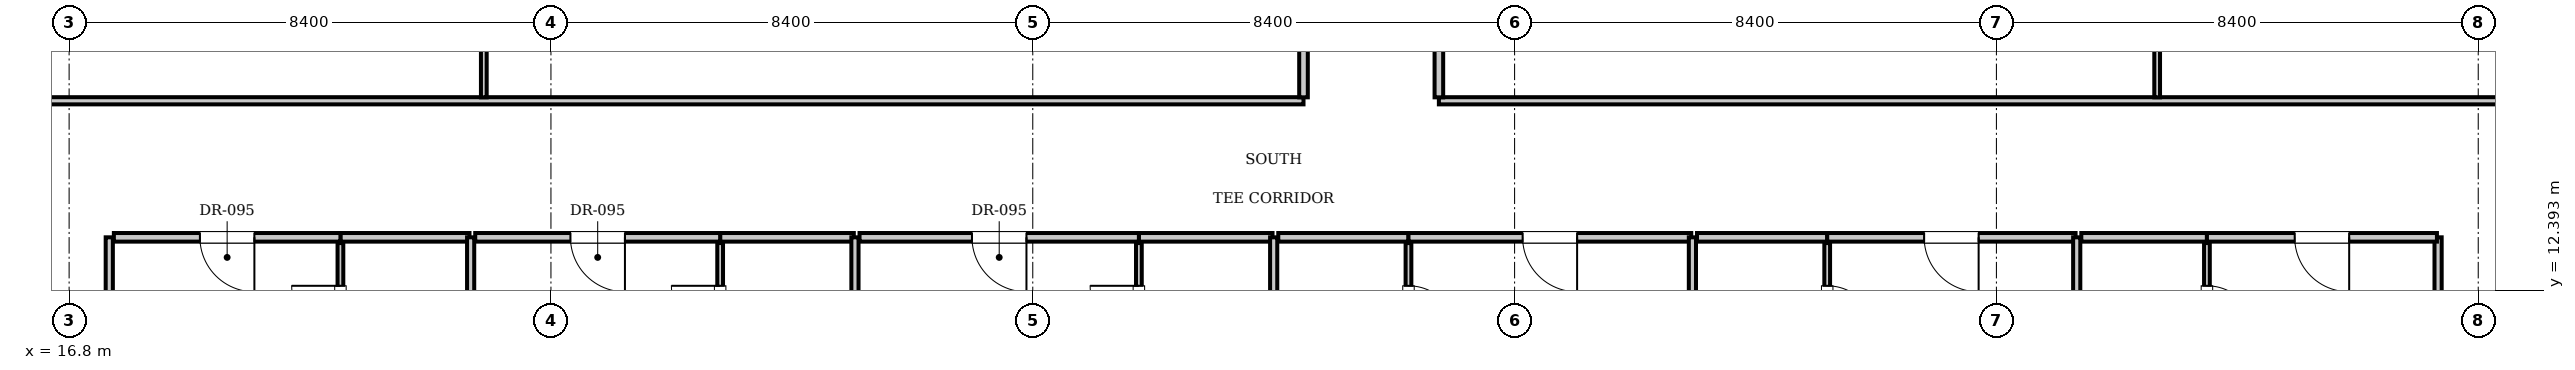
"""IFC4 building model, lengths in metres.
Left out: names, types, materials, properties, quantities, classifications, styles, units other than length and angle.
Written with IfcOpenShell. Run it as: python <this file> out.ifc"""

import sys

from ifc_helpers import new_model, si_unit, direction, frame, frame_2d, origin, place, context, subcontext, project, spatial, rectangle, extrude, element, fill, save


model = new_model("IFC4")
c1 = context("Model", 3, precision=1e-05, world=origin(), true_north=direction((0.0, 1.0)))
c2 = subcontext(c1, "Body", "Model", "MODEL_VIEW")
j1 = project(units=[si_unit("LENGTHUNIT", "METRE"), si_unit("PLANEANGLEUNIT", "RADIAN")], contexts=[c1])
p1 = place(None, origin())
s1 = spatial("IfcSite", under=j1, at=p1, CompositionType="ELEMENT")
p2 = place(p1, origin())
s2 = spatial("IfcBuilding", under=s1, at=p2, CompositionType="ELEMENT")
p3 = place(p2, frame((0.0, 0.0, 196.7)))
s3 = spatial("IfcBuildingStorey", under=s2, at=p3, CompositionType="ELEMENT", Elevation=196.7)
for number, where, z_axis, x_axis in (
    (1, (17.5, 9.0, 0.0), (0.0, 0.0, 1.0), (0.0, 1.0, 0.0)),
    (2, (58.1, 9.0, 0.0), (0.0, 0.0, 1.0), (0.0, 1.0, 0.0)),
):
    element("IfcWall", number, at=place(p3, frame(where, z_axis=z_axis, x_axis=x_axis)), inside=s3, PredefinedType="PARTITIONING", context=c2, shape_type="SweptSolid", body=[
        extrude(rectangle(XDim=4.32, YDim=0.125, at=frame_2d((2.16, 0.0))), origin(), (0.0, 0.0, 1.0), 3.61),
    ])
p4 = place(p3, frame((21.53, 13.32, 0.0), z_axis=(0.0, 0.0, 1.0), x_axis=(1.0, 0.0, 0.0)))
e3 = element("IfcWall", 3, at=p4, inside=s3, PredefinedType="PARTITIONING", context=c2, shape_type="SweptSolid", body=[
    extrude(rectangle(XDim=2.25, YDim=0.15, at=frame_2d((1.125, 0.0))), origin(), (0.0, 0.0, 1.0), 3.61),
])
p5 = place(p3, frame((21.53, 10.88, 0.0), z_axis=(0.0, 0.0, 1.0), x_axis=(0.0, 1.0, 0.0)))
e4 = element("IfcWall", 4, at=p5, inside=s3, PredefinedType="PARTITIONING", context=c2, shape_type="SweptSolid", body=[
    extrude(rectangle(XDim=2.34, YDim=0.1, at=frame_2d((1.17, 0.0))), origin(), (0.0, 0.0, 1.0), 3.61),
])
p6 = place(p5, frame((0.745, 0.0, 0.0)))
e5 = element("IfcOpeningElement", 5, at=p6, cuts=e4, PredefinedType="OPENING", context=c2, shape_type="SweptSolid", body=[
    extrude(rectangle(XDim=0.85, YDim=2.1, at=frame_2d((0.425, 1.05))), frame((0.0, 0.06, 0.0), z_axis=(0.0, -1.0, 0.0), x_axis=(1.0, 0.0, 0.0)), (0.0, 0.0, 1.0), 0.12),
])
p7 = place(p3, frame((17.58, 13.32, 0.0), z_axis=(0.0, 0.0, 1.0), x_axis=(1.0, 0.0, 0.0)))
e6 = element("IfcWall", 6, at=p7, inside=s3, PredefinedType="PARTITIONING", context=c2, shape_type="SweptSolid", body=[
    extrude(rectangle(XDim=3.95, YDim=0.15, at=frame_2d((1.975, 0.0))), origin(), (0.0, 0.0, 1.0), 3.61),
])
p8 = place(p7, frame((1.5, 0.0, 0.0)))
e7 = element("IfcOpeningElement", 7, at=p8, cuts=e6, PredefinedType="OPENING", context=c2, shape_type="SweptSolid", body=[
    extrude(rectangle(XDim=0.95, YDim=2.15, at=frame_2d((0.475, 1.075))), frame((0.0, 0.085, 0.0), z_axis=(0.0, -1.0, 0.0), x_axis=(1.0, 0.0, 0.0)), (0.0, 0.0, 1.0), 0.17),
])
p9 = place(p3, frame((23.8, 4.7, 0.0), z_axis=(0.0, 0.0, 1.0), x_axis=(0.0, 1.0, 0.0)))
e8 = element("IfcWall", 8, at=p9, inside=s3, PredefinedType="PARTITIONING", context=c2, shape_type="SweptSolid", body=[
    extrude(rectangle(XDim=8.62, YDim=0.125, at=frame_2d((4.31, 0.0))), origin(), (0.0, 0.0, 1.0), 3.61),
])
p10 = place(p3, frame((28.15, 13.32, 0.0), z_axis=(0.0, 0.0, 1.0), x_axis=(1.0, 0.0, 0.0)))
e9 = element("IfcWall", 9, at=p10, inside=s3, PredefinedType="PARTITIONING", context=c2, shape_type="SweptSolid", body=[
    extrude(rectangle(XDim=2.33, YDim=0.15, at=frame_2d((1.165, 0.0))), origin(), (0.0, 0.0, 1.0), 3.61),
])
p11 = place(p3, frame((28.15, 10.88, 0.0), z_axis=(0.0, 0.0, 1.0), x_axis=(0.0, 1.0, 0.0)))
e10 = element("IfcWall", 10, at=p11, inside=s3, PredefinedType="PARTITIONING", context=c2, shape_type="SweptSolid", body=[
    extrude(rectangle(XDim=2.34, YDim=0.1, at=frame_2d((1.17, 0.0))), origin(), (0.0, 0.0, 1.0), 3.61),
])
p12 = place(p11, frame((0.745, 0.0, 0.0)))
e11 = element("IfcOpeningElement", 11, at=p12, cuts=e10, PredefinedType="OPENING", context=c2, shape_type="SweptSolid", body=[
    extrude(rectangle(XDim=0.85, YDim=2.1, at=frame_2d((0.425, 1.05))), frame((0.0, 0.06, 0.0), z_axis=(0.0, -1.0, 0.0), x_axis=(1.0, 0.0, 0.0)), (0.0, 0.0, 1.0), 0.12),
])
p13 = place(p3, frame((23.88, 13.32, 0.0), z_axis=(0.0, 0.0, 1.0), x_axis=(1.0, 0.0, 0.0)))
e12 = element("IfcWall", 12, at=p13, inside=s3, PredefinedType="PARTITIONING", context=c2, shape_type="SweptSolid", body=[
    extrude(rectangle(XDim=4.27, YDim=0.15, at=frame_2d((2.135, 0.0))), origin(), (0.0, 0.0, 1.0), 3.61),
])
p14 = place(p13, frame((1.66, 0.0, 0.0)))
e13 = element("IfcOpeningElement", 13, at=p14, cuts=e12, PredefinedType="OPENING", context=c2, shape_type="SweptSolid", body=[
    extrude(rectangle(XDim=0.95, YDim=2.15, at=frame_2d((0.475, 1.075))), frame((0.0, 0.085, 0.0), z_axis=(0.0, -1.0, 0.0), x_axis=(1.0, 0.0, 0.0)), (0.0, 0.0, 1.0), 0.17),
])
p15 = place(p3, frame((30.5, 4.7, 0.0), z_axis=(0.0, 0.0, 1.0), x_axis=(0.0, 1.0, 0.0)))
e14 = element("IfcWall", 14, at=p15, inside=s3, PredefinedType="PARTITIONING", context=c2, shape_type="SweptSolid", body=[
    extrude(rectangle(XDim=8.62, YDim=0.125, at=frame_2d((4.31, 0.0))), origin(), (0.0, 0.0, 1.0), 3.61),
])
p16 = place(p3, frame((35.45, 13.32, 0.0), z_axis=(0.0, 0.0, 1.0), x_axis=(1.0, 0.0, 0.0)))
e15 = element("IfcWall", 15, at=p16, inside=s3, PredefinedType="PARTITIONING", context=c2, shape_type="SweptSolid", body=[
    extrude(rectangle(XDim=2.33, YDim=0.15, at=frame_2d((1.165, 0.0))), origin(), (0.0, 0.0, 1.0), 3.61),
])
p17 = place(p3, frame((35.45, 10.88, 0.0), z_axis=(0.0, 0.0, 1.0), x_axis=(0.0, 1.0, 0.0)))
e16 = element("IfcWall", 16, at=p17, inside=s3, PredefinedType="PARTITIONING", context=c2, shape_type="SweptSolid", body=[
    extrude(rectangle(XDim=2.34, YDim=0.1, at=frame_2d((1.17, 0.0))), origin(), (0.0, 0.0, 1.0), 3.61),
])
p18 = place(p17, frame((0.745, 0.0, 0.0)))
e17 = element("IfcOpeningElement", 17, at=p18, cuts=e16, PredefinedType="OPENING", context=c2, shape_type="SweptSolid", body=[
    extrude(rectangle(XDim=0.85, YDim=2.1, at=frame_2d((0.425, 1.05))), frame((0.0, 0.06, 0.0), z_axis=(0.0, -1.0, 0.0), x_axis=(1.0, 0.0, 0.0)), (0.0, 0.0, 1.0), 0.12),
])
p19 = place(p3, frame((30.58, 13.32, 0.0), z_axis=(0.0, 0.0, 1.0), x_axis=(1.0, 0.0, 0.0)))
e18 = element("IfcWall", 18, at=p19, inside=s3, PredefinedType="PARTITIONING", context=c2, shape_type="SweptSolid", body=[
    extrude(rectangle(XDim=4.87, YDim=0.15, at=frame_2d((2.435, 0.0))), origin(), (0.0, 0.0, 1.0), 3.61),
])
p20 = place(p19, frame((1.96, 0.0, 0.0)))
e19 = element("IfcOpeningElement", 19, at=p20, cuts=e18, PredefinedType="OPENING", context=c2, shape_type="SweptSolid", body=[
    extrude(rectangle(XDim=0.95, YDim=2.15, at=frame_2d((0.475, 1.075))), frame((0.0, 0.085, 0.0), z_axis=(0.0, -1.0, 0.0), x_axis=(1.0, 0.0, 0.0)), (0.0, 0.0, 1.0), 0.17),
])
p21 = place(p3, frame((37.8, 4.7, 0.0), z_axis=(0.0, 0.0, 1.0), x_axis=(0.0, 1.0, 0.0)))
e20 = element("IfcWall", 20, at=p21, inside=s3, PredefinedType="PARTITIONING", context=c2, shape_type="SweptSolid", body=[
    extrude(rectangle(XDim=8.62, YDim=0.125, at=frame_2d((4.31, 0.0))), origin(), (0.0, 0.0, 1.0), 3.344),
])
p22 = place(p3, frame((37.88, 13.32, 0.0), z_axis=(0.0, 0.0, 1.0), x_axis=(1.0, 0.0, 0.0)))
e21 = element("IfcWall", 21, at=p22, inside=s3, PredefinedType="PARTITIONING", context=c2, shape_type="SweptSolid", body=[
    extrude(rectangle(XDim=2.27, YDim=0.15, at=frame_2d((1.135, 0.0))), origin(), (0.0, 0.0, 1.0), 3.61),
])
p23 = place(p3, frame((40.15, 10.88, 0.0), z_axis=(0.0, 0.0, 1.0), x_axis=(0.0, 1.0, 0.0)))
e22 = element("IfcWall", 22, at=p23, inside=s3, PredefinedType="PARTITIONING", context=c2, shape_type="SweptSolid", body=[
    extrude(rectangle(XDim=2.34, YDim=0.1, at=frame_2d((1.17, 0.0))), origin(), (0.0, 0.0, 1.0), 3.61),
])
p24 = place(p23, frame((0.745, 0.0, 0.0)))
e23 = element("IfcOpeningElement", 23, at=p24, cuts=e22, PredefinedType="OPENING", context=c2, shape_type="SweptSolid", body=[
    extrude(rectangle(XDim=0.85, YDim=2.1, at=frame_2d((0.425, 1.05))), frame((0.0, 0.06, 0.0), z_axis=(0.0, -1.0, 0.0), x_axis=(1.0, 0.0, 0.0)), (0.0, 0.0, 1.0), 0.12),
])
p25 = place(p3, frame((40.15, 13.32, 0.0), z_axis=(0.0, 0.0, 1.0), x_axis=(1.0, 0.0, 0.0)))
e24 = element("IfcWall", 24, at=p25, inside=s3, PredefinedType="PARTITIONING", context=c2, shape_type="SweptSolid", body=[
    extrude(rectangle(XDim=4.93, YDim=0.15, at=frame_2d((2.465, 0.0))), origin(), (0.0, 0.0, 1.0), 3.61),
])
p26 = place(p25, frame((1.99, 0.0, 0.0)))
e25 = element("IfcOpeningElement", 25, at=p26, cuts=e24, PredefinedType="OPENING", context=c2, shape_type="SweptSolid", body=[
    extrude(rectangle(XDim=0.95, YDim=2.15, at=frame_2d((0.475, 1.075))), frame((0.0, 0.085, 0.0), z_axis=(0.0, -1.0, 0.0), x_axis=(1.0, 0.0, 0.0)), (0.0, 0.0, 1.0), 0.17),
])
p27 = place(p3, frame((45.1, 4.7, 0.0), z_axis=(0.0, 0.0, 1.0), x_axis=(0.0, 1.0, 0.0)))
e26 = element("IfcWall", 26, at=p27, inside=s3, PredefinedType="PARTITIONING", context=c2, shape_type="SweptSolid", body=[
    extrude(rectangle(XDim=8.62, YDim=0.125, at=frame_2d((4.31, 0.0))), origin(), (0.0, 0.0, 1.0), 3.61),
])
p28 = place(p3, frame((45.18, 13.32, 0.0), z_axis=(0.0, 0.0, 1.0), x_axis=(1.0, 0.0, 0.0)))
e27 = element("IfcWall", 27, at=p28, inside=s3, PredefinedType="PARTITIONING", context=c2, shape_type="SweptSolid", body=[
    extrude(rectangle(XDim=2.27, YDim=0.15, at=frame_2d((1.135, 0.0))), origin(), (0.0, 0.0, 1.0), 3.61),
])
p29 = place(p3, frame((47.45, 10.88, 0.0), z_axis=(0.0, 0.0, 1.0), x_axis=(0.0, 1.0, 0.0)))
e28 = element("IfcWall", 28, at=p29, inside=s3, PredefinedType="PARTITIONING", context=c2, shape_type="SweptSolid", body=[
    extrude(rectangle(XDim=2.34, YDim=0.1, at=frame_2d((1.17, 0.0))), origin(), (0.0, 0.0, 1.0), 3.61),
])
p30 = place(p29, frame((0.745, 0.0, 0.0)))
e29 = element("IfcOpeningElement", 29, at=p30, cuts=e28, PredefinedType="OPENING", context=c2, shape_type="SweptSolid", body=[
    extrude(rectangle(XDim=0.85, YDim=2.1, at=frame_2d((0.425, 1.05))), frame((0.0, 0.06, 0.0), z_axis=(0.0, -1.0, 0.0), x_axis=(1.0, 0.0, 0.0)), (0.0, 0.0, 1.0), 0.12),
])
p31 = place(p3, frame((47.45, 13.32, 0.0), z_axis=(0.0, 0.0, 1.0), x_axis=(1.0, 0.0, 0.0)))
e30 = element("IfcWall", 30, at=p31, inside=s3, PredefinedType="PARTITIONING", context=c2, shape_type="SweptSolid", body=[
    extrude(rectangle(XDim=4.33, YDim=0.15, at=frame_2d((2.165, 0.0))), origin(), (0.0, 0.0, 1.0), 3.61),
])
p32 = place(p31, frame((1.69, 0.0, 0.0)))
e31 = element("IfcOpeningElement", 31, at=p32, cuts=e30, PredefinedType="OPENING", context=c2, shape_type="SweptSolid", body=[
    extrude(rectangle(XDim=0.95, YDim=2.15, at=frame_2d((0.475, 1.075))), frame((0.0, 0.085, 0.0), z_axis=(0.0, -1.0, 0.0), x_axis=(1.0, 0.0, 0.0)), (0.0, 0.0, 1.0), 0.17),
])
p33 = place(p3, frame((51.8, 4.7, 0.0), z_axis=(0.0, 0.0, 1.0), x_axis=(0.0, 1.0, 0.0)))
e32 = element("IfcWall", 32, at=p33, inside=s3, PredefinedType="PARTITIONING", context=c2, shape_type="SweptSolid", body=[
    extrude(rectangle(XDim=8.62, YDim=0.125, at=frame_2d((4.31, 0.0))), origin(), (0.0, 0.0, 1.0), 3.61),
])
p34 = place(p3, frame((51.88, 13.32, 0.0), z_axis=(0.0, 0.0, 1.0), x_axis=(1.0, 0.0, 0.0)))
e33 = element("IfcWall", 33, at=p34, inside=s3, PredefinedType="PARTITIONING", context=c2, shape_type="SweptSolid", body=[
    extrude(rectangle(XDim=2.19, YDim=0.15, at=frame_2d((1.095, 0.0))), origin(), (0.0, 0.0, 1.0), 3.61),
])
p35 = place(p3, frame((54.07, 10.88, 0.0), z_axis=(0.0, 0.0, 1.0), x_axis=(0.0, 1.0, 0.0)))
e34 = element("IfcWall", 34, at=p35, inside=s3, PredefinedType="PARTITIONING", context=c2, shape_type="SweptSolid", body=[
    extrude(rectangle(XDim=2.34, YDim=0.1, at=frame_2d((1.17, 0.0))), origin(), (0.0, 0.0, 1.0), 3.61),
])
p36 = place(p35, frame((0.745, 0.0, 0.0)))
e35 = element("IfcOpeningElement", 35, at=p36, cuts=e34, PredefinedType="OPENING", context=c2, shape_type="SweptSolid", body=[
    extrude(rectangle(XDim=0.85, YDim=2.1, at=frame_2d((0.425, 1.05))), frame((0.0, 0.06, 0.0), z_axis=(0.0, -1.0, 0.0), x_axis=(1.0, 0.0, 0.0)), (0.0, 0.0, 1.0), 0.12),
])
p37 = place(p3, frame((54.07, 13.32, 0.0), z_axis=(0.0, 0.0, 1.0), x_axis=(1.0, 0.0, 0.0)))
e36 = element("IfcWall", 36, at=p37, inside=s3, PredefinedType="PARTITIONING", context=c2, shape_type="SweptSolid", body=[
    extrude(rectangle(XDim=4.01, YDim=0.15, at=frame_2d((2.005, 0.0))), origin(), (0.0, 0.0, 1.0), 3.61),
])
p38 = place(p37, frame((1.53, 0.0, 0.0)))
e37 = element("IfcOpeningElement", 37, at=p38, cuts=e36, PredefinedType="OPENING", context=c2, shape_type="SweptSolid", body=[
    extrude(rectangle(XDim=0.95, YDim=2.15, at=frame_2d((0.475, 1.075))), frame((0.0, 0.085, 0.0), z_axis=(0.0, -1.0, 0.0), x_axis=(1.0, 0.0, 0.0)), (0.0, 0.0, 1.0), 0.17),
])
p39 = place(p3, frame((13.2, 15.7, 0.0), z_axis=(0.0, 0.0, 1.0), x_axis=(1.0, 0.0, 0.0)))
e38 = element("IfcWall", 38, at=p39, inside=s3, PredefinedType="PARTITIONING", context=c2, shape_type="SweptSolid", body=[
    extrude(rectangle(XDim=25.12, YDim=0.125, at=frame_2d((12.56, 0.0))), origin(), (0.0, 0.0, 1.0), 3.61),
])
p40 = place(p3, frame((40.68, 15.7, 0.0), z_axis=(0.0, 0.0, 1.0), x_axis=(1.0, 0.0, 0.0)))
e39 = element("IfcWall", 39, at=p40, inside=s3, PredefinedType="PARTITIONING", context=c2, shape_type="SweptSolid", body=[
    extrude(rectangle(XDim=21.72, YDim=0.125, at=frame_2d((10.86, 0.0))), origin(), (0.0, 0.0, 1.0), 3.61),
])
p41 = place(p3, frame((38.32, 15.76, 0.0), z_axis=(0.0, 0.0, 1.0), x_axis=(0.0, 1.0, 0.0)))
e40 = element("IfcWall", 40, at=p41, inside=s3, PredefinedType="PARTITIONING", context=c2, shape_type="SweptSolid", body=[
    extrude(rectangle(XDim=5.14, YDim=0.15, at=frame_2d((2.57, 0.0))), origin(), (0.0, 0.0, 1.0), 3.61),
])
p42 = place(p41, frame((2.095, 0.0, 0.0)))
e41 = element("IfcOpeningElement", 41, at=p42, cuts=e40, PredefinedType="OPENING", context=c2, shape_type="SweptSolid", body=[
    extrude(rectangle(XDim=0.95, YDim=2.15, at=frame_2d((0.475, 1.075))), frame((0.0, 0.085, 0.0), z_axis=(0.0, -1.0, 0.0), x_axis=(1.0, 0.0, 0.0)), (0.0, 0.0, 1.0), 0.17),
])
p43 = place(p3, frame((24.03, 15.76, 0.0), z_axis=(0.0, 0.0, 1.0), x_axis=(0.0, 1.0, 0.0)))
e42 = element("IfcWall", 42, at=p43, inside=s3, PredefinedType="PARTITIONING", context=c2, shape_type="SweptSolid", body=[
    extrude(rectangle(XDim=7.43, YDim=0.1, at=frame_2d((3.715, 0.0))), origin(), (0.0, 0.0, 1.0), 3.61),
])
p44 = place(p43, frame((3.265, 0.0, 0.0)))
e43 = element("IfcOpeningElement", 43, at=p44, cuts=e42, PredefinedType="OPENING", context=c2, shape_type="SweptSolid", body=[
    extrude(rectangle(XDim=0.9, YDim=2.1, at=frame_2d((0.45, 1.05))), frame((0.0, 0.06, 0.0), z_axis=(0.0, -1.0, 0.0), x_axis=(1.0, 0.0, 0.0)), (0.0, 0.0, 1.0), 0.12),
])
p45 = place(p3, frame((40.68, 15.76, 0.0), z_axis=(0.0, 0.0, 1.0), x_axis=(0.0, 1.0, 0.0)))
e44 = element("IfcWall", 44, at=p45, inside=s3, PredefinedType="PARTITIONING", context=c2, shape_type="SweptSolid", body=[
    extrude(rectangle(XDim=5.14, YDim=0.15, at=frame_2d((2.57, 0.0))), origin(), (0.0, 0.0, 1.0), 3.61),
])
p46 = place(p45, frame((3.055, 0.0, 0.0)))
e45 = element("IfcOpeningElement", 45, at=p46, cuts=e44, PredefinedType="OPENING", context=c2, shape_type="SweptSolid", body=[
    extrude(rectangle(XDim=0.95, YDim=2.15, at=frame_2d((0.475, 1.075))), frame((0.0, 0.085, 0.0), z_axis=(0.0, -1.0, 0.0), x_axis=(1.0, 0.0, 0.0)), (0.0, 0.0, 1.0), 0.17),
])
p47 = place(p3, frame((53.202, 15.76, 0.0), z_axis=(0.0, 0.0, 1.0), x_axis=(0.0, 1.0, 0.0)))
e46 = element("IfcWall", 46, at=p47, inside=s3, PredefinedType="PARTITIONING", context=c2, shape_type="SweptSolid", body=[
    extrude(rectangle(XDim=7.43, YDim=0.1, at=frame_2d((3.715, 0.0))), origin(), (0.0, 0.0, 1.0), 3.61),
])
p48 = place(p47, frame((3.265, 0.0, 0.0)))
e47 = element("IfcOpeningElement", 47, at=p48, cuts=e46, PredefinedType="OPENING", context=c2, shape_type="SweptSolid", body=[
    extrude(rectangle(XDim=0.9, YDim=2.1, at=frame_2d((0.45, 1.05))), frame((0.0, 0.06, 0.0), z_axis=(0.0, -1.0, 0.0), x_axis=(1.0, 0.0, 0.0)), (0.0, 0.0, 1.0), 0.12),
])
p49 = place(p6, origin())
e48 = element("IfcDoor", 48, at=p49, inside=s3, OperationType="SINGLE_SWING_RIGHT", PredefinedType="DOOR", context=c2, shape_type="SweptSolid", body=[
    extrude(rectangle(XDim=0.85, YDim=2.1, at=frame_2d((0.425, 1.05))), frame((0.0, 0.025, 0.0), z_axis=(0.0, -1.0, 0.0), x_axis=(1.0, 0.0, 0.0)), (0.0, 0.0, 1.0), 0.05),
])
fill(e5, e48)
p50 = place(p8, frame((0.95, 0.0, 0.0), z_axis=(0.0, 0.0, 1.0), x_axis=(-1.0, 0.0, 0.0)))
e49 = element("IfcDoor", 49, at=p50, inside=s3, OperationType="SINGLE_SWING_LEFT", PredefinedType="DOOR", context=c2, shape_type="SweptSolid", body=[
    extrude(rectangle(XDim=0.95, YDim=2.15, at=frame_2d((0.475, 1.075))), frame((0.0, 0.025, 0.0), z_axis=(0.0, -1.0, 0.0), x_axis=(1.0, 0.0, 0.0)), (0.0, 0.0, 1.0), 0.05),
])
fill(e7, e49)
p51 = place(p12, origin())
e50 = element("IfcDoor", 50, at=p51, inside=s3, OperationType="SINGLE_SWING_RIGHT", PredefinedType="DOOR", context=c2, shape_type="SweptSolid", body=[
    extrude(rectangle(XDim=0.85, YDim=2.1, at=frame_2d((0.425, 1.05))), frame((0.0, 0.025, 0.0), z_axis=(0.0, -1.0, 0.0), x_axis=(1.0, 0.0, 0.0)), (0.0, 0.0, 1.0), 0.05),
])
fill(e11, e50)
p52 = place(p14, frame((0.95, 0.0, 0.0), z_axis=(0.0, 0.0, 1.0), x_axis=(-1.0, 0.0, 0.0)))
e51 = element("IfcDoor", 51, at=p52, inside=s3, OperationType="SINGLE_SWING_LEFT", PredefinedType="DOOR", context=c2, shape_type="SweptSolid", body=[
    extrude(rectangle(XDim=0.95, YDim=2.15, at=frame_2d((0.475, 1.075))), frame((0.0, 0.025, 0.0), z_axis=(0.0, -1.0, 0.0), x_axis=(1.0, 0.0, 0.0)), (0.0, 0.0, 1.0), 0.05),
])
fill(e13, e51)
p53 = place(p18, origin())
e52 = element("IfcDoor", 52, at=p53, inside=s3, OperationType="SINGLE_SWING_RIGHT", PredefinedType="DOOR", context=c2, shape_type="SweptSolid", body=[
    extrude(rectangle(XDim=0.85, YDim=2.1, at=frame_2d((0.425, 1.05))), frame((0.0, 0.025, 0.0), z_axis=(0.0, -1.0, 0.0), x_axis=(1.0, 0.0, 0.0)), (0.0, 0.0, 1.0), 0.05),
])
fill(e17, e52)
p54 = place(p20, frame((0.95, 0.0, 0.0), z_axis=(0.0, 0.0, 1.0), x_axis=(-1.0, 0.0, 0.0)))
e53 = element("IfcDoor", 53, at=p54, inside=s3, OperationType="SINGLE_SWING_LEFT", PredefinedType="DOOR", context=c2, shape_type="SweptSolid", body=[
    extrude(rectangle(XDim=0.95, YDim=2.15, at=frame_2d((0.475, 1.075))), frame((0.0, 0.025, 0.0), z_axis=(0.0, -1.0, 0.0), x_axis=(1.0, 0.0, 0.0)), (0.0, 0.0, 1.0), 0.05),
])
fill(e19, e53)
p55 = place(p24, frame((0.85, 0.0, 0.0), z_axis=(0.0, 0.0, 1.0), x_axis=(-1.0, 0.0, 0.0)))
e54 = element("IfcDoor", 54, at=p55, inside=s3, OperationType="SINGLE_SWING_RIGHT", PredefinedType="DOOR", context=c2, shape_type="SweptSolid", body=[
    extrude(rectangle(XDim=0.85, YDim=2.1, at=frame_2d((0.425, 1.05))), frame((0.0, 0.025, 0.0), z_axis=(0.0, -1.0, 0.0), x_axis=(1.0, 0.0, 0.0)), (0.0, 0.0, 1.0), 0.05),
])
fill(e23, e54)
p56 = place(p26, frame((0.95, 0.0, 0.0), z_axis=(0.0, 0.0, 1.0), x_axis=(-1.0, 0.0, 0.0)))
e55 = element("IfcDoor", 55, at=p56, inside=s3, OperationType="SINGLE_SWING_LEFT", PredefinedType="DOOR", context=c2, shape_type="SweptSolid", body=[
    extrude(rectangle(XDim=0.95, YDim=2.15, at=frame_2d((0.475, 1.075))), frame((0.0, 0.025, 0.0), z_axis=(0.0, -1.0, 0.0), x_axis=(1.0, 0.0, 0.0)), (0.0, 0.0, 1.0), 0.05),
])
fill(e25, e55)
p57 = place(p30, frame((0.85, 0.0, 0.0), z_axis=(0.0, 0.0, 1.0), x_axis=(-1.0, 0.0, 0.0)))
e56 = element("IfcDoor", 56, at=p57, inside=s3, OperationType="SINGLE_SWING_RIGHT", PredefinedType="DOOR", context=c2, shape_type="SweptSolid", body=[
    extrude(rectangle(XDim=0.85, YDim=2.1, at=frame_2d((0.425, 1.05))), frame((0.0, 0.025, 0.0), z_axis=(0.0, -1.0, 0.0), x_axis=(1.0, 0.0, 0.0)), (0.0, 0.0, 1.0), 0.05),
])
fill(e29, e56)
p58 = place(p32, frame((0.95, 0.0, 0.0), z_axis=(0.0, 0.0, 1.0), x_axis=(-1.0, 0.0, 0.0)))
e57 = element("IfcDoor", 57, at=p58, inside=s3, OperationType="SINGLE_SWING_LEFT", PredefinedType="DOOR", context=c2, shape_type="SweptSolid", body=[
    extrude(rectangle(XDim=0.95, YDim=2.15, at=frame_2d((0.475, 1.075))), frame((0.0, 0.025, 0.0), z_axis=(0.0, -1.0, 0.0), x_axis=(1.0, 0.0, 0.0)), (0.0, 0.0, 1.0), 0.05),
])
fill(e31, e57)
p59 = place(p36, frame((0.85, 0.0, 0.0), z_axis=(0.0, 0.0, 1.0), x_axis=(-1.0, 0.0, 0.0)))
e58 = element("IfcDoor", 58, at=p59, inside=s3, OperationType="SINGLE_SWING_RIGHT", PredefinedType="DOOR", context=c2, shape_type="SweptSolid", body=[
    extrude(rectangle(XDim=0.85, YDim=2.1, at=frame_2d((0.425, 1.05))), frame((0.0, 0.025, 0.0), z_axis=(0.0, -1.0, 0.0), x_axis=(1.0, 0.0, 0.0)), (0.0, 0.0, 1.0), 0.05),
])
fill(e35, e58)
p60 = place(p38, frame((0.95, 0.0, 0.0), z_axis=(0.0, 0.0, 1.0), x_axis=(-1.0, 0.0, 0.0)))
e59 = element("IfcDoor", 59, at=p60, inside=s3, OperationType="SINGLE_SWING_LEFT", PredefinedType="DOOR", context=c2, shape_type="SweptSolid", body=[
    extrude(rectangle(XDim=0.95, YDim=2.15, at=frame_2d((0.475, 1.075))), frame((0.0, 0.025, 0.0), z_axis=(0.0, -1.0, 0.0), x_axis=(1.0, 0.0, 0.0)), (0.0, 0.0, 1.0), 0.05),
])
fill(e37, e59)
save(model, sys.argv[1])
